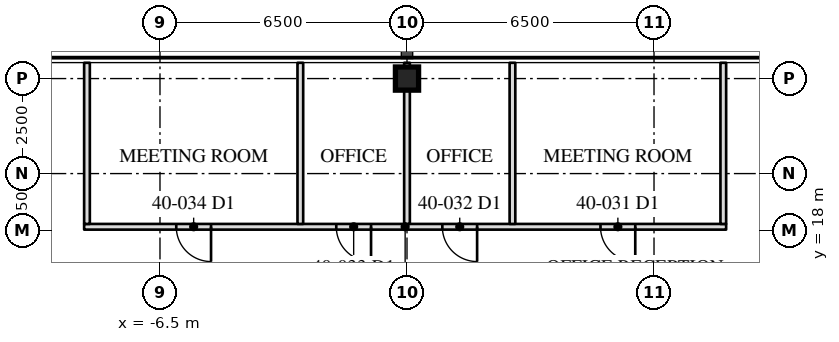
"""IFC4 building model, lengths in metres.
Left out: names, types, materials, properties, quantities, classifications, styles, units other than length and angle.
Written with IfcOpenShell. Run it as: python <this file> out.ifc"""

import sys

from ifc_helpers import new_model, si_unit, direction, frame, frame_2d, origin, origin_2d, place, context, subcontext, project, spatial, rectangle, hollow_rectangle, extrude, element, fill, save


model = new_model("IFC4")
c1 = context("Model", 3, precision=1e-05, world=origin(), true_north=direction((0.0, 1.0)))
c2 = subcontext(c1, "Body", "Model", "MODEL_VIEW")
j1 = project(units=[si_unit("LENGTHUNIT", "METRE"), si_unit("PLANEANGLEUNIT", "RADIAN")], contexts=[c1])
p1 = place(None, origin())
s1 = spatial("IfcSite", under=j1, at=p1, CompositionType="ELEMENT")
p2 = place(p1, origin())
s2 = spatial("IfcBuilding", under=s1, at=p2, CompositionType="ELEMENT")
p3 = place(p2, frame((0.0, 0.0, 170.5)))
s3 = spatial("IfcBuildingStorey", under=s2, at=p3, CompositionType="ELEMENT", Elevation=170.5)
p4 = place(p3, frame((0.0, 22.0, 0.0), z_axis=(0.0, 0.0, 1.0), x_axis=(1.0, 0.0, 0.0)))
e1 = element("IfcColumn", 1, at=p4, inside=s3, PredefinedType="COLUMN", context=c2, shape_type="SweptSolid", body=[
    extrude(hollow_rectangle(XDim=0.61, YDim=0.61, WallThickness=0.076, at=origin_2d()), origin(), (0.0, 0.0, 1.0), 4.1),
])
p5 = place(p3, frame((8.398, 18.1, 0.0), z_axis=(0.0, 0.0, 1.0), x_axis=(-1.0, 0.0, 0.0)))
e2 = element("IfcWall", 2, at=p5, inside=s3, PredefinedType="PARTITIONING", context=c2, shape_type="SweptSolid", body=[
    extrude(rectangle(XDim=16.894, YDim=0.15, at=frame_2d((8.447, 0.0))), origin(), (0.0, 0.0, 1.0), 3.91),
])
p6 = place(p5, frame((2.392, 0.0, 0.0)))
e3 = element("IfcOpeningElement", 3, at=p6, cuts=e2, PredefinedType="OPENING", context=c2, shape_type="SweptSolid", body=[
    extrude(rectangle(XDim=0.915, YDim=2.134, at=frame_2d((0.458, 1.067))), frame((0.0, 0.085, 0.0), z_axis=(0.0, -1.0, 0.0), x_axis=(1.0, 0.0, 0.0)), (0.0, 0.0, 1.0), 0.17),
])
p7 = place(p5, frame((6.553, 0.0, 0.0)))
e4 = element("IfcOpeningElement", 4, at=p7, cuts=e2, PredefinedType="OPENING", context=c2, shape_type="SweptSolid", body=[
    extrude(rectangle(XDim=0.915, YDim=2.134, at=frame_2d((0.458, 1.067))), frame((0.0, 0.085, 0.0), z_axis=(0.0, -1.0, 0.0), x_axis=(1.0, 0.0, 0.0)), (0.0, 0.0, 1.0), 0.17),
])
p8 = place(p5, frame((9.344, 0.0, 0.0)))
e5 = element("IfcOpeningElement", 5, at=p8, cuts=e2, PredefinedType="OPENING", context=c2, shape_type="SweptSolid", body=[
    extrude(rectangle(XDim=0.915, YDim=2.134, at=frame_2d((0.458, 1.067))), frame((0.0, 0.085, 0.0), z_axis=(0.0, -1.0, 0.0), x_axis=(1.0, 0.0, 0.0)), (0.0, 0.0, 1.0), 0.17),
])
p9 = place(p5, frame((13.554, 0.0, 0.0)))
e6 = element("IfcOpeningElement", 6, at=p9, cuts=e2, PredefinedType="OPENING", context=c2, shape_type="SweptSolid", body=[
    extrude(rectangle(XDim=0.915, YDim=2.134, at=frame_2d((0.458, 1.067))), frame((0.0, 0.085, 0.0), z_axis=(0.0, -1.0, 0.0), x_axis=(1.0, 0.0, 0.0)), (0.0, 0.0, 1.0), 0.17),
])
for number, where, z_axis, x_axis in (
    (7, (8.323, 18.175, 0.0), (0.0, 0.0, 1.0), (0.0, 1.0, 0.0)),
    (8, (2.775, 18.175, 0.0), (0.0, 0.0, 1.0), (0.0, 1.0, 0.0)),
):
    element("IfcWall", number, at=place(p3, frame(where, z_axis=z_axis, x_axis=x_axis)), inside=s3, PredefinedType="PARTITIONING", context=c2, shape_type="SweptSolid", body=[
        extrude(rectangle(XDim=4.24, YDim=0.15, at=frame_2d((2.12, 0.0))), origin(), (0.0, 0.0, 1.0), 3.91),
    ])
p10 = place(p3, frame((0.0, 18.175, 0.0), z_axis=(0.0, 0.0, 1.0), x_axis=(0.0, 1.0, 0.0)))
e9 = element("IfcWall", 9, at=p10, inside=s3, PredefinedType="PARTITIONING", context=c2, shape_type="SweptSolid", body=[
    extrude(rectangle(XDim=4.24, YDim=0.15, at=frame_2d((2.12, 0.0))), origin(), (0.0, 0.0, 1.0), 3.326),
])
for number, where, z_axis, x_axis in (
    (10, (-2.807, 18.175, 0.0), (0.0, 0.0, 1.0), (0.0, 1.0, 0.0)),
    (11, (-8.421, 18.175, 0.0), (0.0, 0.0, 1.0), (0.0, 1.0, 0.0)),
):
    element("IfcWall", number, at=place(p3, frame(where, z_axis=z_axis, x_axis=x_axis)), inside=s3, PredefinedType="PARTITIONING", context=c2, shape_type="SweptSolid", body=[
        extrude(rectangle(XDim=4.24, YDim=0.15, at=frame_2d((2.12, 0.0))), origin(), (0.0, 0.0, 1.0), 3.91),
    ])
p11 = place(p6, origin())
e12 = element("IfcDoor", 12, at=p11, inside=s3, OperationType="SINGLE_SWING_LEFT", PredefinedType="DOOR", context=c2, shape_type="SweptSolid", body=[
    extrude(rectangle(XDim=0.915, YDim=2.134, at=frame_2d((0.458, 1.067))), frame((0.0, 0.025, 0.0), z_axis=(0.0, -1.0, 0.0), x_axis=(1.0, 0.0, 0.0)), (0.0, 0.0, 1.0), 0.05),
])
fill(e3, e12)
p12 = place(p7, origin())
e13 = element("IfcDoor", 13, at=p12, inside=s3, OperationType="SINGLE_SWING_LEFT", PredefinedType="DOOR", context=c2, shape_type="SweptSolid", body=[
    extrude(rectangle(XDim=0.915, YDim=2.134, at=frame_2d((0.458, 1.067))), frame((0.0, 0.025, 0.0), z_axis=(0.0, -1.0, 0.0), x_axis=(1.0, 0.0, 0.0)), (0.0, 0.0, 1.0), 0.05),
])
fill(e4, e13)
p13 = place(p8, origin())
e14 = element("IfcDoor", 14, at=p13, inside=s3, OperationType="SINGLE_SWING_LEFT", PredefinedType="DOOR", context=c2, shape_type="SweptSolid", body=[
    extrude(rectangle(XDim=0.915, YDim=2.134, at=frame_2d((0.458, 1.067))), frame((0.0, 0.025, 0.0), z_axis=(0.0, -1.0, 0.0), x_axis=(1.0, 0.0, 0.0)), (0.0, 0.0, 1.0), 0.05),
])
fill(e5, e14)
p14 = place(p9, origin())
e15 = element("IfcDoor", 15, at=p14, inside=s3, OperationType="SINGLE_SWING_LEFT", PredefinedType="DOOR", context=c2, shape_type="SweptSolid", body=[
    extrude(rectangle(XDim=0.915, YDim=2.134, at=frame_2d((0.458, 1.067))), frame((0.0, 0.025, 0.0), z_axis=(0.0, -1.0, 0.0), x_axis=(1.0, 0.0, 0.0)), (0.0, 0.0, 1.0), 0.05),
])
fill(e6, e15)
save(model, sys.argv[1])
